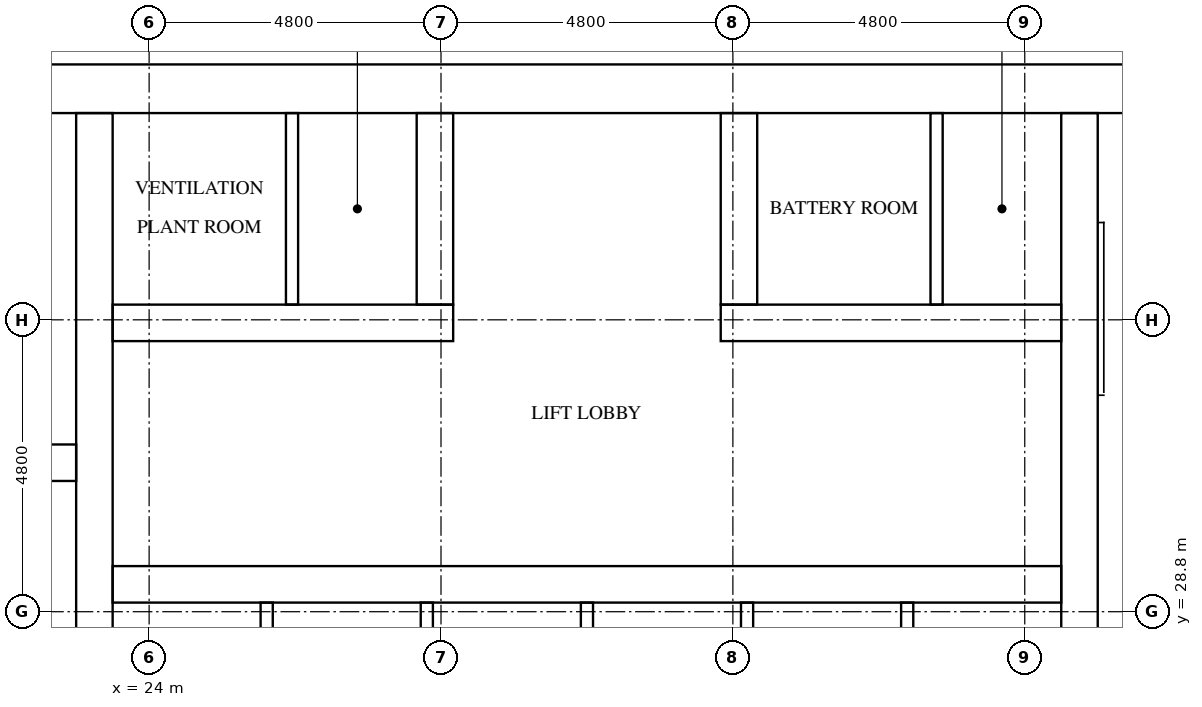
"""IFC4 building model, lengths in metres.
Left out: names, types, materials, properties, quantities, classifications, styles, units other than length and angle.
Written with IfcOpenShell. Run it as: python <this file> out.ifc"""

import sys

from ifc_helpers import new_model, si_unit, direction, frame, frame_2d, origin, place, context, subcontext, project, spatial, rectangle, extrude, element, fill, save


model = new_model("IFC4")
c1 = context("Model", 3, precision=1e-05, world=origin(), true_north=direction((0.0, 1.0)))
c2 = subcontext(c1, "Body", "Model", "MODEL_VIEW")
j1 = project(units=[si_unit("LENGTHUNIT", "METRE"), si_unit("PLANEANGLEUNIT", "RADIAN")], contexts=[c1])
p1 = place(None, origin())
s1 = spatial("IfcSite", under=j1, at=p1, CompositionType="ELEMENT")
p2 = place(p1, origin())
s2 = spatial("IfcBuilding", under=s1, at=p2, CompositionType="ELEMENT")
p3 = place(p2, frame((0.0, 0.0, 170.0)))
s3 = spatial("IfcBuildingStorey", under=s2, at=p3, CompositionType="ELEMENT", Elevation=170.0)
p4 = place(p3, frame((15.0, 37.4, 0.0), z_axis=(0.0, 0.0, 1.0), x_axis=(1.0, 0.0, 0.0)))
e1 = element("IfcWall", 1, at=p4, inside=s3, PredefinedType="SHEAR", context=c2, shape_type="SweptSolid", body=[
    extrude(rectangle(XDim=32.4, YDim=0.8, at=frame_2d((16.2, 0.0))), origin(), (0.0, 0.0, 1.0), 3.1),
])
p5 = place(p4, frame((15.3, 0.0, 0.0)))
e2 = element("IfcOpeningElement", 2, at=p5, cuts=e1, PredefinedType="OPENING", context=c2, shape_type="SweptSolid", body=[
    extrude(rectangle(XDim=1.8, YDim=2.1, at=frame_2d((0.9, 1.05))), frame((0.0, 0.41, 0.0), z_axis=(0.0, -1.0, 0.0), x_axis=(1.0, 0.0, 0.0)), (0.0, 0.0, 1.0), 0.82),
])
p6 = place(p4, frame((1.51, 0.0, 0.0)))
e3 = element("IfcOpeningElement", 3, at=p6, cuts=e1, PredefinedType="OPENING", context=c2, shape_type="SweptSolid", body=[
    extrude(rectangle(XDim=1.0, YDim=2.1, at=frame_2d((0.5, 1.05))), frame((0.0, 0.41, 0.0), z_axis=(0.0, -1.0, 0.0), x_axis=(1.0, 0.0, 0.0)), (0.0, 0.0, 1.0), 0.82),
])
p7 = place(p4, frame((5.11, 0.0, 0.0)))
e4 = element("IfcOpeningElement", 4, at=p7, cuts=e1, PredefinedType="OPENING", context=c2, shape_type="SweptSolid", body=[
    extrude(rectangle(XDim=1.0, YDim=2.1, at=frame_2d((0.5, 1.05))), frame((0.0, 0.41, 0.0), z_axis=(0.0, -1.0, 0.0), x_axis=(1.0, 0.0, 0.0)), (0.0, 0.0, 1.0), 0.82),
])
p8 = place(p3, frame((23.1, 15.8, 0.0), z_axis=(0.0, 0.0, 1.0), x_axis=(0.0, 1.0, 0.0)))
e5 = element("IfcWall", 5, at=p8, inside=s3, PredefinedType="SHEAR", context=c2, shape_type="SweptSolid", body=[
    extrude(rectangle(XDim=21.2, YDim=0.6, at=frame_2d((10.6, 0.0))), origin(), (0.0, 0.0, 1.0), 3.1),
])
p9 = place(p3, frame((39.3, 27.75, 0.0), z_axis=(0.0, 0.0, 1.0), x_axis=(0.0, 1.0, 0.0)))
e6 = element("IfcWall", 6, at=p9, inside=s3, PredefinedType="SHEAR", context=c2, shape_type="SweptSolid", body=[
    extrude(rectangle(XDim=9.25, YDim=0.6, at=frame_2d((4.625, 0.0))), origin(), (0.0, 0.0, 1.0), 3.1),
])
p10 = place(p3, frame((15.8, 31.25, 0.0), z_axis=(0.0, 0.0, 1.0), x_axis=(1.0, 0.0, 0.0)))
e7 = element("IfcWall", 7, at=p10, inside=s3, PredefinedType="SHEAR", context=c2, shape_type="SweptSolid", body=[
    extrude(rectangle(XDim=7.0, YDim=0.6, at=frame_2d((3.5, 0.0))), origin(), (0.0, 0.0, 1.0), 3.1),
])
p11 = place(p3, frame((23.4, 29.25, 0.0), z_axis=(0.0, 0.0, 1.0), x_axis=(1.0, 0.0, 0.0)))
e8 = element("IfcWall", 8, at=p11, inside=s3, PredefinedType="SHEAR", context=c2, shape_type="SweptSolid", body=[
    extrude(rectangle(XDim=15.6, YDim=0.6, at=frame_2d((7.8, 0.0))), origin(), (0.0, 0.0, 1.0), 3.1),
])
p12 = place(p11, frame((0.667, 0.0, 0.0)))
e9 = element("IfcOpeningElement", 9, at=p12, cuts=e8, PredefinedType="OPENING", context=c2, shape_type="SweptSolid", body=[
    extrude(rectangle(XDim=1.1, YDim=2.1, at=frame_2d((0.55, 1.05))), frame((0.0, 0.31, 0.0), z_axis=(0.0, -1.0, 0.0), x_axis=(1.0, 0.0, 0.0)), (0.0, 0.0, 1.0), 0.62),
])
p13 = place(p11, frame((3.3, 0.0, 0.0)))
e10 = element("IfcOpeningElement", 10, at=p13, cuts=e8, PredefinedType="OPENING", context=c2, shape_type="SweptSolid", body=[
    extrude(rectangle(XDim=1.1, YDim=2.1, at=frame_2d((0.55, 1.05))), frame((0.0, 0.31, 0.0), z_axis=(0.0, -1.0, 0.0), x_axis=(1.0, 0.0, 0.0)), (0.0, 0.0, 1.0), 0.62),
])
p14 = place(p11, frame((5.933, 0.0, 0.0)))
e11 = element("IfcOpeningElement", 11, at=p14, cuts=e8, PredefinedType="OPENING", context=c2, shape_type="SweptSolid", body=[
    extrude(rectangle(XDim=1.1, YDim=2.1, at=frame_2d((0.55, 1.05))), frame((0.0, 0.31, 0.0), z_axis=(0.0, -1.0, 0.0), x_axis=(1.0, 0.0, 0.0)), (0.0, 0.0, 1.0), 0.62),
])
p15 = place(p11, frame((8.567, 0.0, 0.0)))
e12 = element("IfcOpeningElement", 12, at=p15, cuts=e8, PredefinedType="OPENING", context=c2, shape_type="SweptSolid", body=[
    extrude(rectangle(XDim=1.1, YDim=2.1, at=frame_2d((0.55, 1.05))), frame((0.0, 0.31, 0.0), z_axis=(0.0, -1.0, 0.0), x_axis=(1.0, 0.0, 0.0)), (0.0, 0.0, 1.0), 0.62),
])
p16 = place(p11, frame((11.2, 0.0, 0.0)))
e13 = element("IfcOpeningElement", 13, at=p16, cuts=e8, PredefinedType="OPENING", context=c2, shape_type="SweptSolid", body=[
    extrude(rectangle(XDim=1.1, YDim=2.1, at=frame_2d((0.55, 1.05))), frame((0.0, 0.31, 0.0), z_axis=(0.0, -1.0, 0.0), x_axis=(1.0, 0.0, 0.0)), (0.0, 0.0, 1.0), 0.62),
])
p17 = place(p11, frame((13.833, 0.0, 0.0)))
e14 = element("IfcOpeningElement", 14, at=p17, cuts=e8, PredefinedType="OPENING", context=c2, shape_type="SweptSolid", body=[
    extrude(rectangle(XDim=1.1, YDim=2.1, at=frame_2d((0.55, 1.05))), frame((0.0, 0.31, 0.0), z_axis=(0.0, -1.0, 0.0), x_axis=(1.0, 0.0, 0.0)), (0.0, 0.0, 1.0), 0.62),
])
p18 = place(p3, frame((23.4, 33.55, 0.0), z_axis=(0.0, 0.0, 1.0), x_axis=(1.0, 0.0, 0.0)))
e15 = element("IfcWall", 15, at=p18, inside=s3, PredefinedType="SHEAR", context=c2, shape_type="SweptSolid", body=[
    extrude(rectangle(XDim=5.6, YDim=0.6, at=frame_2d((2.8, 0.0))), origin(), (0.0, 0.0, 1.0), 3.1),
])
p19 = place(p18, frame((0.925, 0.0, 0.0)))
e16 = element("IfcOpeningElement", 16, at=p19, cuts=e15, PredefinedType="OPENING", context=c2, shape_type="SweptSolid", body=[
    extrude(rectangle(XDim=1.0, YDim=2.1, at=frame_2d((0.5, 1.05))), frame((0.0, 0.31, 0.0), z_axis=(0.0, -1.0, 0.0), x_axis=(1.0, 0.0, 0.0)), (0.0, 0.0, 1.0), 0.62),
])
p20 = place(p18, frame((3.525, 0.0, 0.0)))
e17 = element("IfcOpeningElement", 17, at=p20, cuts=e15, PredefinedType="OPENING", context=c2, shape_type="SweptSolid", body=[
    extrude(rectangle(XDim=1.0, YDim=2.1, at=frame_2d((0.5, 1.05))), frame((0.0, 0.31, 0.0), z_axis=(0.0, -1.0, 0.0), x_axis=(1.0, 0.0, 0.0)), (0.0, 0.0, 1.0), 0.62),
])
p21 = place(p3, frame((33.4, 33.55, 0.0), z_axis=(0.0, 0.0, 1.0), x_axis=(1.0, 0.0, 0.0)))
e18 = element("IfcWall", 18, at=p21, inside=s3, PredefinedType="SHEAR", context=c2, shape_type="SweptSolid", body=[
    extrude(rectangle(XDim=5.6, YDim=0.6, at=frame_2d((2.8, 0.0))), origin(), (0.0, 0.0, 1.0), 3.1),
])
p22 = place(p21, frame((1.525, 0.0, 0.0)))
e19 = element("IfcOpeningElement", 19, at=p22, cuts=e18, PredefinedType="OPENING", context=c2, shape_type="SweptSolid", body=[
    extrude(rectangle(XDim=1.0, YDim=2.1, at=frame_2d((0.5, 1.05))), frame((0.0, 0.31, 0.0), z_axis=(0.0, -1.0, 0.0), x_axis=(1.0, 0.0, 0.0)), (0.0, 0.0, 1.0), 0.62),
])
p23 = place(p21, frame((4.125, 0.0, 0.0)))
e20 = element("IfcOpeningElement", 20, at=p23, cuts=e18, PredefinedType="OPENING", context=c2, shape_type="SweptSolid", body=[
    extrude(rectangle(XDim=1.0, YDim=2.1, at=frame_2d((0.5, 1.05))), frame((0.0, 0.31, 0.0), z_axis=(0.0, -1.0, 0.0), x_axis=(1.0, 0.0, 0.0)), (0.0, 0.0, 1.0), 0.62),
])
for number, where, z_axis, x_axis in (
    (21, (28.7, 33.85, 0.0), (0.0, 0.0, 1.0), (0.0, 1.0, 0.0)),
    (22, (33.7, 33.85, 0.0), (0.0, 0.0, 1.0), (0.0, 1.0, 0.0)),
):
    element("IfcWall", number, at=place(p3, frame(where, z_axis=z_axis, x_axis=x_axis)), inside=s3, PredefinedType="SHEAR", context=c2, shape_type="SweptSolid", body=[
        extrude(rectangle(XDim=3.15, YDim=0.6, at=frame_2d((1.575, 0.0))), origin(), (0.0, 0.0, 1.0), 3.1),
    ])
for number, where, z_axis, x_axis in (
    (23, (25.933, 26.45, 0.0), (0.0, 0.0, 1.0), (0.0, 1.0, 0.0)),
    (24, (28.567, 26.45, 0.0), (0.0, 0.0, 1.0), (0.0, 1.0, 0.0)),
    (25, (31.2, 26.45, 0.0), (0.0, 0.0, 1.0), (0.0, 1.0, 0.0)),
    (26, (33.833, 26.45, 0.0), (0.0, 0.0, 1.0), (0.0, 1.0, 0.0)),
    (27, (36.467, 26.45, 0.0), (0.0, 0.0, 1.0), (0.0, 1.0, 0.0)),
):
    element("IfcWall", number, at=place(p3, frame(where, z_axis=z_axis, x_axis=x_axis)), inside=s3, PredefinedType="SOLIDWALL", context=c2, shape_type="SweptSolid", body=[
        extrude(rectangle(XDim=2.5, YDim=0.2, at=frame_2d((1.25, 0.0))), origin(), (0.0, 0.0, 1.0), 3.1),
    ])
for number, where, z_axis, x_axis in (
    (28, (26.35, 33.85, 0.0), (0.0, 0.0, 1.0), (0.0, 1.0, 0.0)),
    (29, (36.95, 33.85, 0.0), (0.0, 0.0, 1.0), (0.0, 1.0, 0.0)),
):
    element("IfcWall", number, at=place(p3, frame(where, z_axis=z_axis, x_axis=x_axis)), inside=s3, PredefinedType="PARTITIONING", context=c2, shape_type="SweptSolid", body=[
        extrude(rectangle(XDim=3.15, YDim=0.2, at=frame_2d((1.575, 0.0))), origin(), (0.0, 0.0, 1.0), 3.1),
    ])
p24 = place(p12, origin())
e30 = element("IfcDoor", 30, at=p24, inside=s3, OperationType="DOUBLE_DOOR_SLIDING", PredefinedType="DOOR", context=c2, shape_type="SweptSolid", body=[
    extrude(rectangle(XDim=1.1, YDim=2.1, at=frame_2d((0.55, 1.05))), frame((0.0, 0.025, 0.0), z_axis=(0.0, -1.0, 0.0), x_axis=(1.0, 0.0, 0.0)), (0.0, 0.0, 1.0), 0.05),
])
fill(e9, e30)
p25 = place(p13, origin())
e31 = element("IfcDoor", 31, at=p25, inside=s3, OperationType="DOUBLE_DOOR_SLIDING", PredefinedType="DOOR", context=c2, shape_type="SweptSolid", body=[
    extrude(rectangle(XDim=1.1, YDim=2.1, at=frame_2d((0.55, 1.05))), frame((0.0, 0.025, 0.0), z_axis=(0.0, -1.0, 0.0), x_axis=(1.0, 0.0, 0.0)), (0.0, 0.0, 1.0), 0.05),
])
fill(e10, e31)
p26 = place(p14, origin())
e32 = element("IfcDoor", 32, at=p26, inside=s3, OperationType="DOUBLE_DOOR_SLIDING", PredefinedType="DOOR", context=c2, shape_type="SweptSolid", body=[
    extrude(rectangle(XDim=1.1, YDim=2.1, at=frame_2d((0.55, 1.05))), frame((0.0, 0.025, 0.0), z_axis=(0.0, -1.0, 0.0), x_axis=(1.0, 0.0, 0.0)), (0.0, 0.0, 1.0), 0.05),
])
fill(e11, e32)
p27 = place(p15, origin())
e33 = element("IfcDoor", 33, at=p27, inside=s3, OperationType="DOUBLE_DOOR_SLIDING", PredefinedType="DOOR", context=c2, shape_type="SweptSolid", body=[
    extrude(rectangle(XDim=1.1, YDim=2.1, at=frame_2d((0.55, 1.05))), frame((0.0, 0.025, 0.0), z_axis=(0.0, -1.0, 0.0), x_axis=(1.0, 0.0, 0.0)), (0.0, 0.0, 1.0), 0.05),
])
fill(e12, e33)
p28 = place(p16, origin())
e34 = element("IfcDoor", 34, at=p28, inside=s3, OperationType="DOUBLE_DOOR_SLIDING", PredefinedType="DOOR", context=c2, shape_type="SweptSolid", body=[
    extrude(rectangle(XDim=1.1, YDim=2.1, at=frame_2d((0.55, 1.05))), frame((0.0, 0.025, 0.0), z_axis=(0.0, -1.0, 0.0), x_axis=(1.0, 0.0, 0.0)), (0.0, 0.0, 1.0), 0.05),
])
fill(e13, e34)
p29 = place(p17, origin())
e35 = element("IfcDoor", 35, at=p29, inside=s3, OperationType="DOUBLE_DOOR_SLIDING", PredefinedType="DOOR", context=c2, shape_type="SweptSolid", body=[
    extrude(rectangle(XDim=1.1, YDim=2.1, at=frame_2d((0.55, 1.05))), frame((0.0, 0.025, 0.0), z_axis=(0.0, -1.0, 0.0), x_axis=(1.0, 0.0, 0.0)), (0.0, 0.0, 1.0), 0.05),
])
fill(e14, e35)
p30 = place(p5, origin())
e36 = element("IfcDoor", 36, at=p30, inside=s3, OperationType="DOUBLE_DOOR_SINGLE_SWING", PredefinedType="DOOR", context=c2, shape_type="SweptSolid", body=[
    extrude(rectangle(XDim=1.8, YDim=2.1, at=frame_2d((0.9, 1.05))), frame((0.0, 0.025, 0.0), z_axis=(0.0, -1.0, 0.0), x_axis=(1.0, 0.0, 0.0)), (0.0, 0.0, 1.0), 0.05),
])
fill(e2, e36)
p31 = place(p19, frame((1.0, 0.0, 0.0), z_axis=(0.0, 0.0, 1.0), x_axis=(-1.0, 0.0, 0.0)))
e37 = element("IfcDoor", 37, at=p31, inside=s3, OperationType="SINGLE_SWING_RIGHT", PredefinedType="DOOR", context=c2, shape_type="SweptSolid", body=[
    extrude(rectangle(XDim=1.0, YDim=2.1, at=frame_2d((0.5, 1.05))), frame((0.0, 0.025, 0.0), z_axis=(0.0, -1.0, 0.0), x_axis=(1.0, 0.0, 0.0)), (0.0, 0.0, 1.0), 0.05),
])
fill(e16, e37)
p32 = place(p20, frame((1.0, 0.0, 0.0), z_axis=(0.0, 0.0, 1.0), x_axis=(-1.0, 0.0, 0.0)))
e38 = element("IfcDoor", 38, at=p32, inside=s3, OperationType="SINGLE_SWING_LEFT", PredefinedType="DOOR", context=c2, shape_type="SweptSolid", body=[
    extrude(rectangle(XDim=1.0, YDim=2.1, at=frame_2d((0.5, 1.05))), frame((0.0, 0.025, 0.0), z_axis=(0.0, -1.0, 0.0), x_axis=(1.0, 0.0, 0.0)), (0.0, 0.0, 1.0), 0.05),
])
fill(e17, e38)
p33 = place(p22, frame((1.0, 0.0, 0.0), z_axis=(0.0, 0.0, 1.0), x_axis=(-1.0, 0.0, 0.0)))
e39 = element("IfcDoor", 39, at=p33, inside=s3, OperationType="SINGLE_SWING_RIGHT", PredefinedType="DOOR", context=c2, shape_type="SweptSolid", body=[
    extrude(rectangle(XDim=1.0, YDim=2.1, at=frame_2d((0.5, 1.05))), frame((0.0, 0.025, 0.0), z_axis=(0.0, -1.0, 0.0), x_axis=(1.0, 0.0, 0.0)), (0.0, 0.0, 1.0), 0.05),
])
fill(e19, e39)
p34 = place(p23, frame((1.0, 0.0, 0.0), z_axis=(0.0, 0.0, 1.0), x_axis=(-1.0, 0.0, 0.0)))
e40 = element("IfcDoor", 40, at=p34, inside=s3, OperationType="SINGLE_SWING_LEFT", PredefinedType="DOOR", context=c2, shape_type="SweptSolid", body=[
    extrude(rectangle(XDim=1.0, YDim=2.1, at=frame_2d((0.5, 1.05))), frame((0.0, 0.025, 0.0), z_axis=(0.0, -1.0, 0.0), x_axis=(1.0, 0.0, 0.0)), (0.0, 0.0, 1.0), 0.05),
])
fill(e20, e40)
save(model, sys.argv[1])
